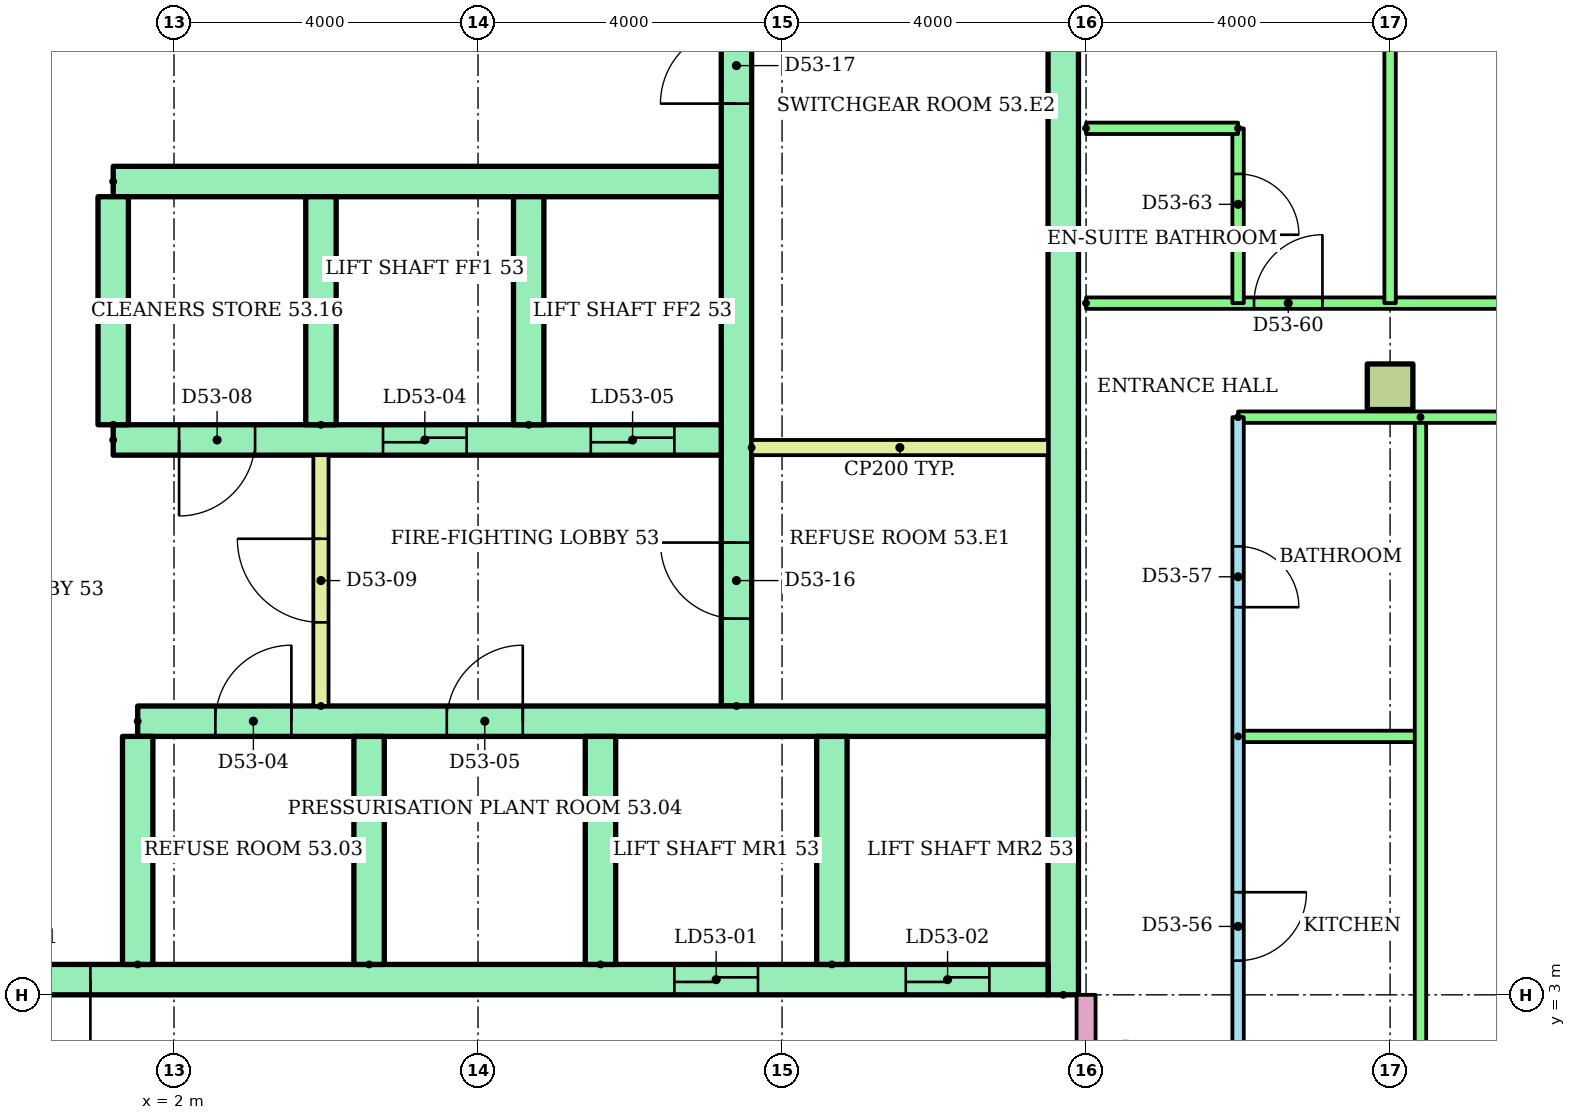
"""IFC4 building model, lengths in metres.
Left out: names, types, materials, properties, quantities, classifications, styles, units other than length and angle.
Written with IfcOpenShell. Run it as: python <this file> out.ifc"""

import sys

from ifc_helpers import new_model, si_unit, direction, frame, frame_2d, origin, origin_2d, place, context, subcontext, project, spatial, rectangle, extrude, element, fill, save


model = new_model("IFC4")
c1 = context("Model", 3, precision=1e-05, world=origin(), true_north=direction((0.0, 1.0)))
c2 = subcontext(c1, "Body", "Model", "MODEL_VIEW")
j1 = project(units=[si_unit("LENGTHUNIT", "METRE"), si_unit("PLANEANGLEUNIT", "RADIAN")], contexts=[c1])
p1 = place(None, origin())
s1 = spatial("IfcSite", under=j1, at=p1, CompositionType="ELEMENT")
p2 = place(p1, origin())
s2 = spatial("IfcBuilding", under=s1, at=p2, CompositionType="ELEMENT")
p3 = place(p2, frame((0.0, 0.0, 207.6)))
s3 = spatial("IfcBuildingStorey", under=s2, at=p3, CompositionType="ELEMENT", Elevation=207.6)
p4 = place(p3, frame((18.0, 11.0, 0.0)))
e1 = element("IfcColumn", 1, at=p4, inside=s3, PredefinedType="COLUMN", context=c2, shape_type="SweptSolid", body=[
    extrude(rectangle(XDim=0.6, YDim=0.6, at=origin_2d()), origin(), (0.0, 0.0, 1.0), 3.2),
])
p5 = place(p3, frame((13.7, 3.0, 0.0), z_axis=(0.0, 0.0, 1.0), x_axis=(0.0, 1.0, 0.0)))
e2 = element("IfcWall", 2, at=p5, inside=s3, PredefinedType="SHEAR", context=c2, shape_type="SweptSolid", body=[
    extrude(rectangle(XDim=17.0, YDim=0.4, at=frame_2d((8.5, 0.0))), origin(), (0.0, 0.0, 1.0), 2.92),
])
p6 = place(p3, frame((9.4, 6.8, 0.0), z_axis=(0.0, 0.0, 1.0), x_axis=(0.0, 1.0, 0.0)))
e3 = element("IfcWall", 3, at=p6, inside=s3, PredefinedType="SHEAR", context=c2, shape_type="SweptSolid", body=[
    extrude(rectangle(XDim=12.7, YDim=0.4, at=frame_2d((6.35, 0.0))), origin(), (0.0, 0.0, 1.0), 2.92),
])
p7 = place(p6, frame((1.15, 0.0, 0.0)))
e4 = element("IfcOpeningElement", 4, at=p7, cuts=e3, PredefinedType="OPENING", context=c2, shape_type="SweptSolid", body=[
    extrude(rectangle(XDim=1.0, YDim=2.1, at=frame_2d((0.5, 1.05))), frame((0.0, 0.21, 0.0), z_axis=(0.0, -1.0, 0.0), x_axis=(1.0, 0.0, 0.0)), (0.0, 0.0, 1.0), 0.42),
])
p8 = place(p6, frame((7.925, 0.0, 0.0)))
e5 = element("IfcOpeningElement", 5, at=p8, cuts=e3, PredefinedType="OPENING", context=c2, shape_type="SweptSolid", body=[
    extrude(rectangle(XDim=1.0, YDim=2.1, at=frame_2d((0.5, 1.05))), frame((0.0, 0.21, 0.0), z_axis=(0.0, -1.0, 0.0), x_axis=(1.0, 0.0, 0.0)), (0.0, 0.0, 1.0), 0.42),
])
p9 = place(p3, frame((-13.5, 3.2, 0.0)))
e6 = element("IfcWall", 6, at=p9, inside=s3, PredefinedType="SHEAR", context=c2, shape_type="SweptSolid", body=[
    extrude(rectangle(XDim=27.0, YDim=0.4, at=frame_2d((13.5, 0.0))), origin(), (0.0, 0.0, 1.0), 2.92),
])
p10 = place(p9, frame((22.083, 0.0, 0.0)))
e7 = element("IfcOpeningElement", 7, at=p10, cuts=e6, PredefinedType="OPENING", context=c2, shape_type="SweptSolid", body=[
    extrude(rectangle(XDim=1.1, YDim=2.1, at=frame_2d((0.55, 1.05))), frame((0.0, 0.21, 0.0), z_axis=(0.0, -1.0, 0.0), x_axis=(1.0, 0.0, 0.0)), (0.0, 0.0, 1.0), 0.42),
])
p11 = place(p9, frame((25.128, 0.0, 0.0)))
e8 = element("IfcOpeningElement", 8, at=p11, cuts=e6, PredefinedType="OPENING", context=c2, shape_type="SweptSolid", body=[
    extrude(rectangle(XDim=1.1, YDim=2.1, at=frame_2d((0.55, 1.05))), frame((0.0, 0.21, 0.0), z_axis=(0.0, -1.0, 0.0), x_axis=(1.0, 0.0, 0.0)), (0.0, 0.0, 1.0), 0.42),
])
p12 = place(p9, frame((12.6, 0.0, 0.0)))
e9 = element("IfcOpeningElement", 9, at=p12, cuts=e6, PredefinedType="OPENING", context=c2, shape_type="SweptSolid", body=[
    extrude(rectangle(XDim=1.8, YDim=2.1, at=frame_2d((0.9, 1.05))), frame((0.0, 0.21, 0.0), z_axis=(0.0, -1.0, 0.0), x_axis=(1.0, 0.0, 0.0)), (0.0, 0.0, 1.0), 0.42),
])
p13 = place(p3, frame((1.522, 6.6, 0.0)))
e10 = element("IfcWall", 10, at=p13, inside=s3, PredefinedType="SHEAR", context=c2, shape_type="SweptSolid", body=[
    extrude(rectangle(XDim=11.978, YDim=0.4, at=frame_2d((5.989, 0.0))), origin(), (0.0, 0.0, 1.0), 2.92),
])
p14 = place(p13, frame((1.022, 0.0, 0.0)))
e11 = element("IfcOpeningElement", 11, at=p14, cuts=e10, PredefinedType="OPENING", context=c2, shape_type="SweptSolid", body=[
    extrude(rectangle(XDim=1.0, YDim=2.1, at=frame_2d((0.5, 1.05))), frame((0.0, 0.21, 0.0), z_axis=(0.0, -1.0, 0.0), x_axis=(1.0, 0.0, 0.0)), (0.0, 0.0, 1.0), 0.42),
])
p15 = place(p13, frame((4.067, 0.0, 0.0)))
e12 = element("IfcOpeningElement", 12, at=p15, cuts=e10, PredefinedType="OPENING", context=c2, shape_type="SweptSolid", body=[
    extrude(rectangle(XDim=1.0, YDim=2.1, at=frame_2d((0.5, 1.05))), frame((0.0, 0.21, 0.0), z_axis=(0.0, -1.0, 0.0), x_axis=(1.0, 0.0, 0.0)), (0.0, 0.0, 1.0), 0.42),
])
for number, where, z_axis, x_axis in (
    (13, (1.522, 3.4, 0.0), (0.0, 0.0, 1.0), (0.0, 1.0, 0.0)),
    (14, (4.567, 3.4, 0.0), (0.0, 0.0, 1.0), (0.0, 1.0, 0.0)),
    (15, (7.611, 3.4, 0.0), (0.0, 0.0, 1.0), (0.0, 1.0, 0.0)),
    (16, (10.656, 3.4, 0.0), (0.0, 0.0, 1.0), (0.0, 1.0, 0.0)),
):
    element("IfcWall", number, at=place(p3, frame(where, z_axis=z_axis, x_axis=x_axis)), inside=s3, PredefinedType="SHEAR", context=c2, shape_type="SweptSolid", body=[
        extrude(rectangle(XDim=3.0, YDim=0.4, at=frame_2d((1.5, 0.0))), origin(), (0.0, 0.0, 1.0), 2.92),
    ])
p16 = place(p3, frame((1.2, 10.3, 0.0)))
e17 = element("IfcWall", 17, at=p16, inside=s3, PredefinedType="SHEAR", context=c2, shape_type="SweptSolid", body=[
    extrude(rectangle(XDim=8.0, YDim=0.4, at=frame_2d((4.0, 0.0))), origin(), (0.0, 0.0, 1.0), 2.92),
])
p17 = place(p16, frame((3.55, 0.0, 0.0)))
e18 = element("IfcOpeningElement", 18, at=p17, cuts=e17, PredefinedType="OPENING", context=c2, shape_type="SweptSolid", body=[
    extrude(rectangle(XDim=1.1, YDim=2.1, at=frame_2d((0.55, 1.05))), frame((0.0, 0.21, 0.0), z_axis=(0.0, -1.0, 0.0), x_axis=(1.0, 0.0, 0.0)), (0.0, 0.0, 1.0), 0.42),
])
p18 = place(p16, frame((6.283, 0.0, 0.0)))
e19 = element("IfcOpeningElement", 19, at=p18, cuts=e17, PredefinedType="OPENING", context=c2, shape_type="SweptSolid", body=[
    extrude(rectangle(XDim=1.1, YDim=2.1, at=frame_2d((0.55, 1.05))), frame((0.0, 0.21, 0.0), z_axis=(0.0, -1.0, 0.0), x_axis=(1.0, 0.0, 0.0)), (0.0, 0.0, 1.0), 0.42),
])
p19 = place(p16, frame((0.867, 0.0, 0.0)))
e20 = element("IfcOpeningElement", 20, at=p19, cuts=e17, PredefinedType="OPENING", context=c2, shape_type="SweptSolid", body=[
    extrude(rectangle(XDim=1.0, YDim=2.1, at=frame_2d((0.5, 1.05))), frame((0.0, 0.21, 0.0), z_axis=(0.0, -1.0, 0.0), x_axis=(1.0, 0.0, 0.0)), (0.0, 0.0, 1.0), 0.42),
])
p20 = place(p3, frame((1.2, 13.7, 0.0)))
e21 = element("IfcWall", 21, at=p20, inside=s3, PredefinedType="SHEAR", context=c2, shape_type="SweptSolid", body=[
    extrude(rectangle(XDim=8.0, YDim=0.4, at=frame_2d((4.0, 0.0))), origin(), (0.0, 0.0, 1.0), 2.92),
])
for number, where, z_axis, x_axis in (
    (22, (1.2, 10.5, 0.0), (0.0, 0.0, 1.0), (0.0, 1.0, 0.0)),
    (23, (3.933, 10.5, 0.0), (0.0, 0.0, 1.0), (0.0, 1.0, 0.0)),
    (24, (6.667, 10.5, 0.0), (0.0, 0.0, 1.0), (0.0, 1.0, 0.0)),
):
    element("IfcWall", number, at=place(p3, frame(where, z_axis=z_axis, x_axis=x_axis)), inside=s3, PredefinedType="SHEAR", context=c2, shape_type="SweptSolid", body=[
        extrude(rectangle(XDim=3.0, YDim=0.4, at=frame_2d((1.5, 0.0))), origin(), (0.0, 0.0, 1.0), 2.92),
    ])
p21 = place(p3, frame((3.933, 6.8, 0.0), z_axis=(0.0, 0.0, 1.0), x_axis=(0.0, 1.0, 0.0)))
e25 = element("IfcWall", 25, at=p21, inside=s3, PredefinedType="PARTITIONING", context=c2, shape_type="SweptSolid", body=[
    extrude(rectangle(XDim=3.3, YDim=0.2, at=frame_2d((1.65, 0.0))), origin(), (0.0, 0.0, 1.0), 2.92),
])
p22 = place(p21, frame((1.1, 0.0, 0.0)))
e26 = element("IfcOpeningElement", 26, at=p22, cuts=e25, PredefinedType="OPENING", context=c2, shape_type="SweptSolid", body=[
    extrude(rectangle(XDim=1.1, YDim=2.1, at=frame_2d((0.55, 1.05))), frame((0.0, 0.11, 0.0), z_axis=(0.0, -1.0, 0.0), x_axis=(1.0, 0.0, 0.0)), (0.0, 0.0, 1.0), 0.22),
])
p23 = place(p3, frame((9.6, 10.2, 0.0)))
e27 = element("IfcWall", 27, at=p23, inside=s3, PredefinedType="PARTITIONING", context=c2, shape_type="SweptSolid", body=[
    extrude(rectangle(XDim=3.9, YDim=0.2, at=frame_2d((1.95, 0.0))), origin(), (0.0, 0.0, 1.0), 2.92),
])
p24 = place(p3, frame((16.0, 10.6, 0.0), z_axis=(0.0, 0.0, 1.0), x_axis=(0.0, -1.0, 0.0)))
e28 = element("IfcWall", 28, at=p24, inside=s3, PredefinedType="PARTITIONING", context=c2, shape_type="SweptSolid", body=[
    extrude(rectangle(XDim=9.2, YDim=0.15, at=frame_2d((4.6, 0.0))), origin(), (0.0, 0.0, 1.0), 2.4),
])
p25 = place(p24, frame((6.25, 0.0, 0.0)))
e29 = element("IfcOpeningElement", 29, at=p25, cuts=e28, PredefinedType="OPENING", context=c2, shape_type="SweptSolid", body=[
    extrude(rectangle(XDim=0.9, YDim=2.1, at=frame_2d((0.45, 1.05))), frame((0.0, 0.085, 0.0), z_axis=(0.0, -1.0, 0.0), x_axis=(1.0, 0.0, 0.0)), (0.0, 0.0, 1.0), 0.17),
])
p26 = place(p24, frame((1.7, 0.0, 0.0)))
e30 = element("IfcOpeningElement", 30, at=p26, cuts=e28, PredefinedType="OPENING", context=c2, shape_type="SweptSolid", body=[
    extrude(rectangle(XDim=0.8, YDim=2.1, at=frame_2d((0.4, 1.05))), frame((0.0, 0.085, 0.0), z_axis=(0.0, -1.0, 0.0), x_axis=(1.0, 0.0, 0.0)), (0.0, 0.0, 1.0), 0.17),
])
p27 = place(p3, frame((16.0, 6.4, 0.0)))
e31 = element("IfcWall", 31, at=p27, inside=s3, PredefinedType="PARTITIONING", context=c2, shape_type="SweptSolid", body=[
    extrude(rectangle(XDim=2.4, YDim=0.15, at=frame_2d((1.2, 0.0))), origin(), (0.0, 0.0, 1.0), 2.4),
])
p28 = place(p3, frame((18.4, 10.6, 0.0), z_axis=(0.0, 0.0, 1.0), x_axis=(0.0, -1.0, 0.0)))
e32 = element("IfcWall", 32, at=p28, inside=s3, PredefinedType="PARTITIONING", context=c2, shape_type="SweptSolid", body=[
    extrude(rectangle(XDim=9.2, YDim=0.15, at=frame_2d((4.6, 0.0))), origin(), (0.0, 0.0, 1.0), 2.4),
])
p29 = place(p3, frame((28.91, 10.6, 0.0), z_axis=(0.0, 0.0, 1.0), x_axis=(-1.0, 0.0, 0.0)))
e33 = element("IfcWall", 33, at=p29, inside=s3, PredefinedType="PARTITIONING", context=c2, shape_type="SweptSolid", body=[
    extrude(rectangle(XDim=12.91, YDim=0.15, at=frame_2d((6.455, 0.0))), origin(), (0.0, 0.0, 1.0), 2.4),
])
p30 = place(p29, frame((7.06, 0.0, 0.0)))
e34 = element("IfcOpeningElement", 34, at=p30, cuts=e33, PredefinedType="OPENING", context=c2, shape_type="SweptSolid", body=[
    extrude(rectangle(XDim=0.9, YDim=2.1, at=frame_2d((0.45, 1.05))), frame((0.0, 0.085, 0.0), z_axis=(0.0, -1.0, 0.0), x_axis=(1.0, 0.0, 0.0)), (0.0, 0.0, 1.0), 0.17),
])
p31 = place(p29, frame((1.534, 0.0, 0.0)))
e35 = element("IfcOpeningElement", 35, at=p31, cuts=e33, PredefinedType="OPENING", context=c2, shape_type="SweptSolid", body=[
    extrude(rectangle(XDim=0.9, YDim=2.1, at=frame_2d((0.45, 1.05))), frame((0.0, 0.085, 0.0), z_axis=(0.0, -1.0, 0.0), x_axis=(1.0, 0.0, 0.0)), (0.0, 0.0, 1.0), 0.17),
])
p32 = place(p3, frame((14.0, 12.1, 0.0)))
e36 = element("IfcWall", 36, at=p32, inside=s3, PredefinedType="PARTITIONING", context=c2, shape_type="SweptSolid", body=[
    extrude(rectangle(XDim=14.92, YDim=0.15, at=frame_2d((7.46, 0.0))), origin(), (0.0, 0.0, 1.0), 2.4),
])
p33 = place(p32, frame((2.21, 0.0, 0.0)))
e37 = element("IfcOpeningElement", 37, at=p33, cuts=e36, PredefinedType="OPENING", context=c2, shape_type="SweptSolid", body=[
    extrude(rectangle(XDim=0.9, YDim=2.1, at=frame_2d((0.45, 1.05))), frame((0.0, 0.085, 0.0), z_axis=(0.0, -1.0, 0.0), x_axis=(1.0, 0.0, 0.0)), (0.0, 0.0, 1.0), 0.17),
])
p34 = place(p32, frame((6.65, 0.0, 0.0)))
e38 = element("IfcOpeningElement", 38, at=p34, cuts=e36, PredefinedType="OPENING", context=c2, shape_type="SweptSolid", body=[
    extrude(rectangle(XDim=0.9, YDim=2.1, at=frame_2d((0.45, 1.05))), frame((0.0, 0.085, 0.0), z_axis=(0.0, -1.0, 0.0), x_axis=(1.0, 0.0, 0.0)), (0.0, 0.0, 1.0), 0.17),
])
p35 = place(p32, frame((12.476, 0.0, 0.0)))
e39 = element("IfcOpeningElement", 39, at=p35, cuts=e36, PredefinedType="OPENING", context=c2, shape_type="SweptSolid", body=[
    extrude(rectangle(XDim=1.0, YDim=2.1, at=frame_2d((0.5, 1.05))), frame((0.0, 0.085, 0.0), z_axis=(0.0, -1.0, 0.0), x_axis=(1.0, 0.0, 0.0)), (0.0, 0.0, 1.0), 0.17),
])
p36 = place(p3, frame((18.0, 18.921, 0.0), z_axis=(0.0, 0.0, 1.0), x_axis=(0.0, -1.0, 0.0)))
e40 = element("IfcWall", 40, at=p36, inside=s3, PredefinedType="PARTITIONING", context=c2, shape_type="SweptSolid", body=[
    extrude(rectangle(XDim=6.821, YDim=0.15, at=frame_2d((3.41, 0.0))), origin(), (0.0, 0.0, 1.0), 2.4),
])
p37 = place(p3, frame((16.0, 14.4, 0.0), z_axis=(0.0, 0.0, 1.0), x_axis=(0.0, -1.0, 0.0)))
e41 = element("IfcWall", 41, at=p37, inside=s3, PredefinedType="PARTITIONING", context=c2, shape_type="SweptSolid", body=[
    extrude(rectangle(XDim=2.3, YDim=0.15, at=frame_2d((1.15, 0.0))), origin(), (0.0, 0.0, 1.0), 2.4),
])
p38 = place(p37, frame((0.6, 0.0, 0.0)))
e42 = element("IfcOpeningElement", 42, at=p38, cuts=e41, PredefinedType="OPENING", context=c2, shape_type="SweptSolid", body=[
    extrude(rectangle(XDim=0.8, YDim=2.1, at=frame_2d((0.4, 1.05))), frame((0.0, 0.085, 0.0), z_axis=(0.0, -1.0, 0.0), x_axis=(1.0, 0.0, 0.0)), (0.0, 0.0, 1.0), 0.17),
])
p39 = place(p3, frame((14.0, 14.4, 0.0)))
e43 = element("IfcWall", 43, at=p39, inside=s3, PredefinedType="PARTITIONING", context=c2, shape_type="SweptSolid", body=[
    extrude(rectangle(XDim=2.0, YDim=0.15, at=frame_2d((1.0, 0.0))), origin(), (0.0, 0.0, 1.0), 2.4),
])
p40 = place(p3, frame((14.0, 1.4, 0.0), z_axis=(0.0, 0.0, 1.0), x_axis=(0.0, 1.0, 0.0)))
e44 = element("IfcWall", 44, at=p40, inside=s3, PredefinedType="PARTITIONING", context=c2, shape_type="SweptSolid", body=[
    extrude(rectangle(XDim=1.6, YDim=0.25, at=frame_2d((0.8, 0.0))), origin(), (0.0, 0.0, 1.0), 2.4),
])
p41 = place(p10, origin())
e45 = element("IfcDoor", 45, at=p41, inside=s3, OperationType="SLIDING_TO_LEFT", PredefinedType="DOOR", context=c2, shape_type="SweptSolid", body=[
    extrude(rectangle(XDim=1.1, YDim=2.1, at=frame_2d((0.55, 1.05))), frame((0.0, 0.025, 0.0), z_axis=(0.0, -1.0, 0.0), x_axis=(1.0, 0.0, 0.0)), (0.0, 0.0, 1.0), 0.05),
])
fill(e7, e45)
p42 = place(p11, origin())
e46 = element("IfcDoor", 46, at=p42, inside=s3, OperationType="SLIDING_TO_LEFT", PredefinedType="DOOR", context=c2, shape_type="SweptSolid", body=[
    extrude(rectangle(XDim=1.1, YDim=2.1, at=frame_2d((0.55, 1.05))), frame((0.0, 0.025, 0.0), z_axis=(0.0, -1.0, 0.0), x_axis=(1.0, 0.0, 0.0)), (0.0, 0.0, 1.0), 0.05),
])
fill(e8, e46)
p43 = place(p12, frame((1.8, 0.0, 0.0), z_axis=(0.0, 0.0, 1.0), x_axis=(-1.0, 0.0, 0.0)))
e47 = element("IfcDoor", 47, at=p43, inside=s3, OperationType="DOUBLE_DOOR_SINGLE_SWING", PredefinedType="DOOR", context=c2, shape_type="SweptSolid", body=[
    extrude(rectangle(XDim=1.8, YDim=2.1, at=frame_2d((0.9, 1.05))), frame((0.0, 0.025, 0.0), z_axis=(0.0, -1.0, 0.0), x_axis=(1.0, 0.0, 0.0)), (0.0, 0.0, 1.0), 0.05),
])
fill(e9, e47)
p44 = place(p14, origin())
e48 = element("IfcDoor", 48, at=p44, inside=s3, OperationType="SINGLE_SWING_RIGHT", PredefinedType="DOOR", context=c2, shape_type="SweptSolid", body=[
    extrude(rectangle(XDim=1.0, YDim=2.1, at=frame_2d((0.5, 1.05))), frame((0.0, 0.025, 0.0), z_axis=(0.0, -1.0, 0.0), x_axis=(1.0, 0.0, 0.0)), (0.0, 0.0, 1.0), 0.05),
])
fill(e11, e48)
p45 = place(p15, origin())
e49 = element("IfcDoor", 49, at=p45, inside=s3, OperationType="SINGLE_SWING_RIGHT", PredefinedType="DOOR", context=c2, shape_type="SweptSolid", body=[
    extrude(rectangle(XDim=1.0, YDim=2.1, at=frame_2d((0.5, 1.05))), frame((0.0, 0.025, 0.0), z_axis=(0.0, -1.0, 0.0), x_axis=(1.0, 0.0, 0.0)), (0.0, 0.0, 1.0), 0.05),
])
fill(e12, e49)
p46 = place(p17, origin())
e50 = element("IfcDoor", 50, at=p46, inside=s3, OperationType="SLIDING_TO_LEFT", PredefinedType="DOOR", context=c2, shape_type="SweptSolid", body=[
    extrude(rectangle(XDim=1.1, YDim=2.1, at=frame_2d((0.55, 1.05))), frame((0.0, 0.025, 0.0), z_axis=(0.0, -1.0, 0.0), x_axis=(1.0, 0.0, 0.0)), (0.0, 0.0, 1.0), 0.05),
])
fill(e18, e50)
p47 = place(p18, origin())
e51 = element("IfcDoor", 51, at=p47, inside=s3, OperationType="SLIDING_TO_LEFT", PredefinedType="DOOR", context=c2, shape_type="SweptSolid", body=[
    extrude(rectangle(XDim=1.1, YDim=2.1, at=frame_2d((0.55, 1.05))), frame((0.0, 0.025, 0.0), z_axis=(0.0, -1.0, 0.0), x_axis=(1.0, 0.0, 0.0)), (0.0, 0.0, 1.0), 0.05),
])
fill(e19, e51)
p48 = place(p19, frame((1.0, 0.0, 0.0), z_axis=(0.0, 0.0, 1.0), x_axis=(-1.0, 0.0, 0.0)))
e52 = element("IfcDoor", 52, at=p48, inside=s3, OperationType="SINGLE_SWING_LEFT", PredefinedType="DOOR", context=c2, shape_type="SweptSolid", body=[
    extrude(rectangle(XDim=1.0, YDim=2.1, at=frame_2d((0.5, 1.05))), frame((0.0, 0.025, 0.0), z_axis=(0.0, -1.0, 0.0), x_axis=(1.0, 0.0, 0.0)), (0.0, 0.0, 1.0), 0.05),
])
fill(e20, e52)
p49 = place(p22, origin())
e53 = element("IfcDoor", 53, at=p49, inside=s3, OperationType="SINGLE_SWING_RIGHT", PredefinedType="DOOR", context=c2, shape_type="SweptSolid", body=[
    extrude(rectangle(XDim=1.1, YDim=2.1, at=frame_2d((0.55, 1.05))), frame((0.0, 0.025, 0.0), z_axis=(0.0, -1.0, 0.0), x_axis=(1.0, 0.0, 0.0)), (0.0, 0.0, 1.0), 0.05),
])
fill(e26, e53)
p50 = place(p7, origin())
e54 = element("IfcDoor", 54, at=p50, inside=s3, OperationType="SINGLE_SWING_RIGHT", PredefinedType="DOOR", context=c2, shape_type="SweptSolid", body=[
    extrude(rectangle(XDim=1.0, YDim=2.1, at=frame_2d((0.5, 1.05))), frame((0.0, 0.025, 0.0), z_axis=(0.0, -1.0, 0.0), x_axis=(1.0, 0.0, 0.0)), (0.0, 0.0, 1.0), 0.05),
])
fill(e4, e54)
p51 = place(p8, origin())
e55 = element("IfcDoor", 55, at=p51, inside=s3, OperationType="SINGLE_SWING_LEFT", PredefinedType="DOOR", context=c2, shape_type="SweptSolid", body=[
    extrude(rectangle(XDim=1.0, YDim=2.1, at=frame_2d((0.5, 1.05))), frame((0.0, 0.025, 0.0), z_axis=(0.0, -1.0, 0.0), x_axis=(1.0, 0.0, 0.0)), (0.0, 0.0, 1.0), 0.05),
])
fill(e5, e55)
p52 = place(p25, origin())
e56 = element("IfcDoor", 56, at=p52, inside=s3, OperationType="SINGLE_SWING_LEFT", PredefinedType="DOOR", context=c2, shape_type="SweptSolid", body=[
    extrude(rectangle(XDim=0.9, YDim=2.1, at=frame_2d((0.45, 1.05))), frame((0.0, 0.025, 0.0), z_axis=(0.0, -1.0, 0.0), x_axis=(1.0, 0.0, 0.0)), (0.0, 0.0, 1.0), 0.05),
])
fill(e29, e56)
p53 = place(p26, origin())
e57 = element("IfcDoor", 57, at=p53, inside=s3, OperationType="SINGLE_SWING_RIGHT", PredefinedType="DOOR", context=c2, shape_type="SweptSolid", body=[
    extrude(rectangle(XDim=0.8, YDim=2.1, at=frame_2d((0.4, 1.05))), frame((0.0, 0.025, 0.0), z_axis=(0.0, -1.0, 0.0), x_axis=(1.0, 0.0, 0.0)), (0.0, 0.0, 1.0), 0.05),
])
fill(e30, e57)
p54 = place(p33, origin())
e58 = element("IfcDoor", 58, at=p54, inside=s3, OperationType="SINGLE_SWING_RIGHT", PredefinedType="DOOR", context=c2, shape_type="SweptSolid", body=[
    extrude(rectangle(XDim=0.9, YDim=2.1, at=frame_2d((0.45, 1.05))), frame((0.0, 0.025, 0.0), z_axis=(0.0, -1.0, 0.0), x_axis=(1.0, 0.0, 0.0)), (0.0, 0.0, 1.0), 0.05),
])
fill(e37, e58)
p55 = place(p38, origin())
e59 = element("IfcDoor", 59, at=p55, inside=s3, OperationType="SINGLE_SWING_RIGHT", PredefinedType="DOOR", context=c2, shape_type="SweptSolid", body=[
    extrude(rectangle(XDim=0.8, YDim=2.1, at=frame_2d((0.4, 1.05))), frame((0.0, 0.025, 0.0), z_axis=(0.0, -1.0, 0.0), x_axis=(1.0, 0.0, 0.0)), (0.0, 0.0, 1.0), 0.05),
])
fill(e42, e59)
save(model, sys.argv[1])
